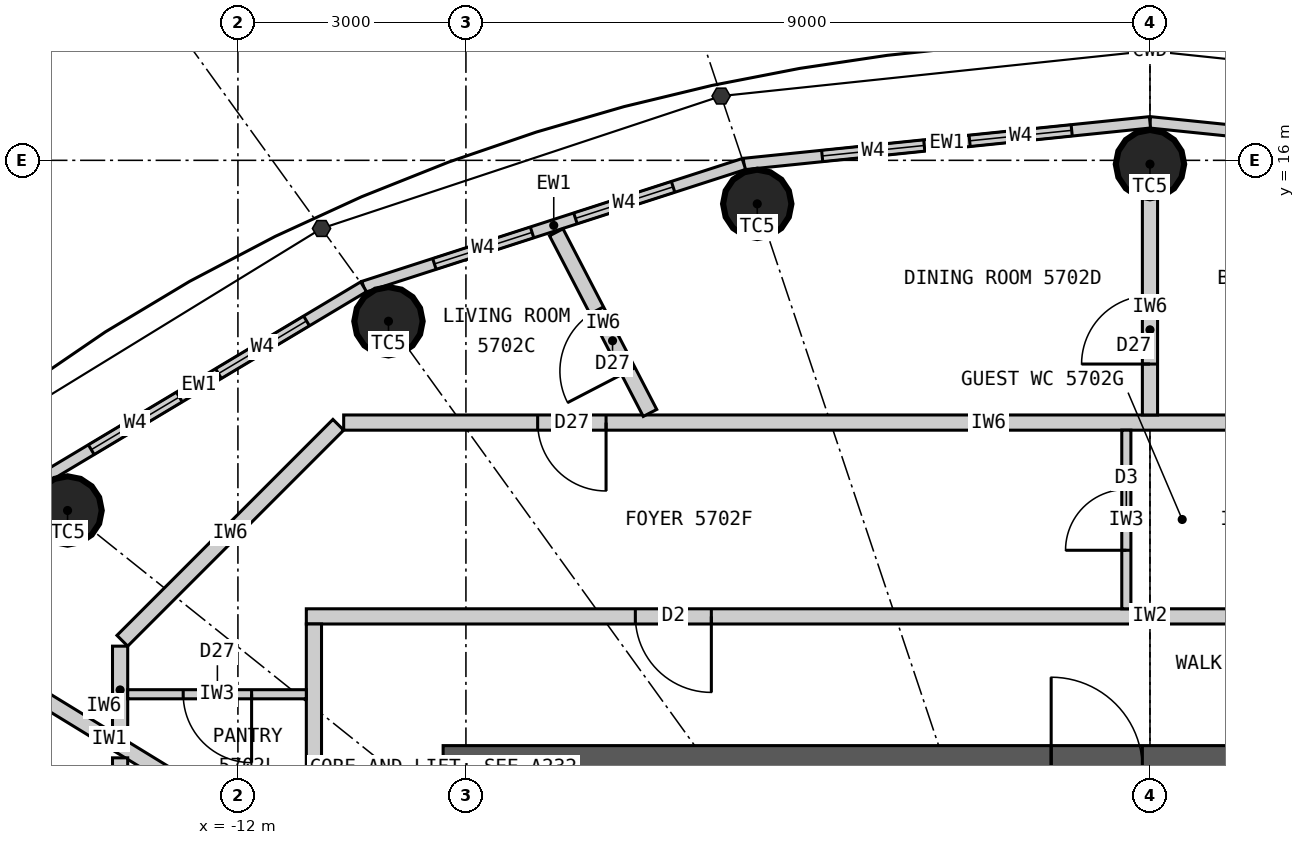
"""IFC4 building model, lengths in metres.
Left out: names, types, materials, properties, quantities, classifications, styles, units other than length and angle.
Written with IfcOpenShell. Run it as: python <this file> out.ifc"""

import sys

from ifc_helpers import new_model, si_unit, direction, frame, frame_2d, origin, origin_2d, place, context, subcontext, project, spatial, rectangle, circle, extrude, element, fill, save


model = new_model("IFC4")
c1 = context("Model", 3, precision=1e-05, world=origin(), true_north=direction((0.0, 1.0)))
c2 = subcontext(c1, "Body", "Model", "MODEL_VIEW")
j1 = project(units=[si_unit("LENGTHUNIT", "METRE"), si_unit("PLANEANGLEUNIT", "RADIAN")], contexts=[c1])
p1 = place(None, origin())
s1 = spatial("IfcSite", under=j1, at=p1, CompositionType="ELEMENT")
p2 = place(p1, origin())
s2 = spatial("IfcBuilding", under=s1, at=p2, CompositionType="ELEMENT")
p3 = place(p2, frame((0.0, 0.0, 212.7)))
s3 = spatial("IfcBuildingStorey", under=s2, at=p3, CompositionType="ELEMENT", Elevation=212.7)
for number, where, z_axis, x_axis in (
    (1, (0.0, 15.95, 0.0), (0.0, 0.0, 1.0), (1.0, 0.0, 0.0)),
    (2, (-5.167, 15.427, 0.0), (0.0, 0.0, 1.0), (1.0, 0.0, 0.0)),
    (3, (-10.019, 13.883, 0.0), (0.0, 0.0, 1.0), (1.0, 0.0, 0.0)),
    (4, (-14.241, 11.393, 0.0), (0.0, 0.0, 1.0), (1.0, 0.0, 0.0)),
):
    element("IfcColumn", number, at=place(p3, frame(where, z_axis=z_axis, x_axis=x_axis)), inside=s3, PredefinedType="COLUMN", context=c2, shape_type="SweptSolid", body=[
        extrude(circle(Radius=0.45, at=origin_2d()), origin(), (0.0, 0.0, 1.0), 3.3),
    ])
p4 = place(p3, frame((-9.3, 8.0, 0.0), z_axis=(0.0, 0.0, 1.0), x_axis=(1.0, 0.0, 0.0)))
e5 = element("IfcWall", 5, at=p4, inside=s3, PredefinedType="SHEAR", context=c2, shape_type="SweptSolid", body=[
    extrude(rectangle(XDim=18.6, YDim=0.6, at=frame_2d((9.3, 0.0))), origin(), (0.0, 0.0, 1.0), 3.3),
])
p5 = place(p4, frame((8.0, 0.0, 0.0)))
e6 = element("IfcOpeningElement", 6, at=p5, cuts=e5, PredefinedType="OPENING", context=c2, shape_type="SweptSolid", body=[
    extrude(rectangle(XDim=1.2, YDim=2.2, at=frame_2d((0.6, 1.1))), frame((0.0, 0.31, 0.0), z_axis=(0.0, -1.0, 0.0), x_axis=(1.0, 0.0, 0.0)), (0.0, 0.0, 1.0), 0.62),
])
p6 = place(p4, frame((15.6, 0.0, 0.0)))
e7 = element("IfcOpeningElement", 7, at=p6, cuts=e5, PredefinedType="OPENING", context=c2, shape_type="SweptSolid", body=[
    extrude(rectangle(XDim=0.9, YDim=2.2, at=frame_2d((0.45, 1.1))), frame((0.0, 0.31, 0.0), z_axis=(0.0, -1.0, 0.0), x_axis=(1.0, 0.0, 0.0)), (0.0, 0.0, 1.0), 0.62),
])
p7 = place(p3, frame((5.343, 15.952, 0.0), z_axis=(0.0, 0.0, 1.0), x_axis=(-0.994774574972, 0.102095763818, 0.0)))
e8 = element("IfcWall", 8, at=p7, inside=s3, PredefinedType="ELEMENTEDWALL", context=c2, shape_type="SweptSolid", body=[
    extrude(rectangle(XDim=5.371, YDim=0.15, at=frame_2d((2.686, 0.0))), origin(), (0.0, 0.0, 1.0), 3.12),
])
p8 = place(p7, frame((1.035, 0.0, 0.9)))
e9 = element("IfcOpeningElement", 9, at=p8, cuts=e8, PredefinedType="OPENING", context=c2, shape_type="SweptSolid", body=[
    extrude(rectangle(XDim=1.35, YDim=1.9, at=frame_2d((0.675, 0.95))), frame((0.0, 0.085, 0.0), z_axis=(0.0, -1.0, 0.0), x_axis=(1.0, 0.0, 0.0)), (0.0, 0.0, 1.0), 0.17),
])
p9 = place(p7, frame((2.985, 0.0, 0.9)))
e10 = element("IfcOpeningElement", 10, at=p9, cuts=e8, PredefinedType="OPENING", context=c2, shape_type="SweptSolid", body=[
    extrude(rectangle(XDim=1.35, YDim=1.9, at=frame_2d((0.675, 0.95))), frame((0.0, 0.085, 0.0), z_axis=(0.0, -1.0, 0.0), x_axis=(1.0, 0.0, 0.0)), (0.0, 0.0, 1.0), 0.17),
])
p10 = place(p3, frame((0.0, 16.5, 0.0), z_axis=(0.0, 0.0, 1.0), x_axis=(-0.994774574972, -0.102095763818, 0.0)))
e11 = element("IfcWall", 11, at=p10, inside=s3, PredefinedType="ELEMENTEDWALL", context=c2, shape_type="SweptSolid", body=[
    extrude(rectangle(XDim=5.371, YDim=0.15, at=frame_2d((2.686, 0.0))), origin(), (0.0, 0.0, 1.0), 3.12),
])
p11 = place(p10, frame((1.035, 0.0, 0.9)))
e12 = element("IfcOpeningElement", 12, at=p11, cuts=e11, PredefinedType="OPENING", context=c2, shape_type="SweptSolid", body=[
    extrude(rectangle(XDim=1.35, YDim=1.9, at=frame_2d((0.675, 0.95))), frame((0.0, 0.085, 0.0), z_axis=(0.0, -1.0, 0.0), x_axis=(1.0, 0.0, 0.0)), (0.0, 0.0, 1.0), 0.17),
])
p12 = place(p10, frame((2.985, 0.0, 0.9)))
e13 = element("IfcOpeningElement", 13, at=p12, cuts=e11, PredefinedType="OPENING", context=c2, shape_type="SweptSolid", body=[
    extrude(rectangle(XDim=1.35, YDim=1.9, at=frame_2d((0.675, 0.95))), frame((0.0, 0.085, 0.0), z_axis=(0.0, -1.0, 0.0), x_axis=(1.0, 0.0, 0.0)), (0.0, 0.0, 1.0), 0.17),
])
p13 = place(p3, frame((-5.343, 15.952, 0.0), z_axis=(0.0, 0.0, 1.0), x_axis=(-0.951644702515, -0.307200846638, 0.0)))
e14 = element("IfcWall", 14, at=p13, inside=s3, PredefinedType="ELEMENTEDWALL", context=c2, shape_type="SweptSolid", body=[
    extrude(rectangle(XDim=5.258, YDim=0.15, at=frame_2d((2.629, 0.0))), origin(), (0.0, 0.0, 1.0), 3.12),
])
p14 = place(p13, frame((0.979, 0.0, 0.9)))
e15 = element("IfcOpeningElement", 15, at=p14, cuts=e14, PredefinedType="OPENING", context=c2, shape_type="SweptSolid", body=[
    extrude(rectangle(XDim=1.35, YDim=1.9, at=frame_2d((0.675, 0.95))), frame((0.0, 0.085, 0.0), z_axis=(0.0, -1.0, 0.0), x_axis=(1.0, 0.0, 0.0)), (0.0, 0.0, 1.0), 0.17),
])
p15 = place(p13, frame((2.929, 0.0, 0.9)))
e16 = element("IfcOpeningElement", 16, at=p15, cuts=e14, PredefinedType="OPENING", context=c2, shape_type="SweptSolid", body=[
    extrude(rectangle(XDim=1.35, YDim=1.9, at=frame_2d((0.675, 0.95))), frame((0.0, 0.085, 0.0), z_axis=(0.0, -1.0, 0.0), x_axis=(1.0, 0.0, 0.0)), (0.0, 0.0, 1.0), 0.17),
])
p16 = place(p3, frame((-10.346, 14.336, 0.0), z_axis=(0.0, 0.0, 1.0), x_axis=(-0.85822150553, -0.513279502265, 0.0)))
e17 = element("IfcWall", 17, at=p16, inside=s3, PredefinedType="ELEMENTEDWALL", context=c2, shape_type="SweptSolid", body=[
    extrude(rectangle(XDim=5.05, YDim=0.15, at=frame_2d((2.525, 0.0))), origin(), (0.0, 0.0, 1.0), 3.12),
])
p17 = place(p16, frame((0.875, 0.0, 0.9)))
e18 = element("IfcOpeningElement", 18, at=p17, cuts=e17, PredefinedType="OPENING", context=c2, shape_type="SweptSolid", body=[
    extrude(rectangle(XDim=1.35, YDim=1.9, at=frame_2d((0.675, 0.95))), frame((0.0, 0.085, 0.0), z_axis=(0.0, -1.0, 0.0), x_axis=(1.0, 0.0, 0.0)), (0.0, 0.0, 1.0), 0.17),
])
p18 = place(p16, frame((2.825, 0.0, 0.9)))
e19 = element("IfcOpeningElement", 19, at=p18, cuts=e17, PredefinedType="OPENING", context=c2, shape_type="SweptSolid", body=[
    extrude(rectangle(XDim=1.35, YDim=1.9, at=frame_2d((0.675, 0.95))), frame((0.0, 0.085, 0.0), z_axis=(0.0, -1.0, 0.0), x_axis=(1.0, 0.0, 0.0)), (0.0, 0.0, 1.0), 0.17),
])
p19 = place(p3, frame((-11.1, 10.0, 0.0), z_axis=(0.0, 0.0, 1.0), x_axis=(1.0, 0.0, 0.0)))
e20 = element("IfcWall", 20, at=p19, inside=s3, PredefinedType="PARTITIONING", context=c2, shape_type="SweptSolid", body=[
    extrude(rectangle(XDim=22.2, YDim=0.2, at=frame_2d((11.1, 0.0))), origin(), (0.0, 0.0, 1.0), 3.12),
])
p20 = place(p19, frame((20.9, 0.0, 0.0)))
e21 = element("IfcOpeningElement", 21, at=p20, cuts=e20, PredefinedType="OPENING", context=c2, shape_type="SweptSolid", body=[
    extrude(rectangle(XDim=1.0, YDim=2.2, at=frame_2d((0.5, 1.1))), frame((0.0, 0.11, 0.0), z_axis=(0.0, -1.0, 0.0), x_axis=(1.0, 0.0, 0.0)), (0.0, 0.0, 1.0), 0.22),
])
p21 = place(p19, frame((4.329, 0.0, 0.0)))
e22 = element("IfcOpeningElement", 22, at=p21, cuts=e20, PredefinedType="OPENING", context=c2, shape_type="SweptSolid", body=[
    extrude(rectangle(XDim=1.0, YDim=2.2, at=frame_2d((0.5, 1.1))), frame((0.0, 0.11, 0.0), z_axis=(0.0, -1.0, 0.0), x_axis=(1.0, 0.0, 0.0)), (0.0, 0.0, 1.0), 0.22),
])
p22 = place(p3, frame((-11.0, 9.9, 0.0), z_axis=(0.0, 0.0, 1.0), x_axis=(0.0, -1.0, 0.0)))
e23 = element("IfcWall", 23, at=p22, inside=s3, PredefinedType="PARTITIONING", context=c2, shape_type="SweptSolid", body=[
    extrude(rectangle(XDim=19.8, YDim=0.2, at=frame_2d((9.9, 0.0))), origin(), (0.0, 0.0, 1.0), 3.12),
])
p23 = place(p22, frame((5.075, 0.0, 0.0)))
e24 = element("IfcOpeningElement", 24, at=p23, cuts=e23, PredefinedType="OPENING", context=c2, shape_type="SweptSolid", body=[
    extrude(rectangle(XDim=1.0, YDim=2.2, at=frame_2d((0.5, 1.1))), frame((0.0, 0.11, 0.0), z_axis=(0.0, -1.0, 0.0), x_axis=(1.0, 0.0, 0.0)), (0.0, 0.0, 1.0), 0.22),
])
p24 = place(p22, frame((18.645, 0.0, 0.0)))
e25 = element("IfcOpeningElement", 25, at=p24, cuts=e23, PredefinedType="OPENING", context=c2, shape_type="SweptSolid", body=[
    extrude(rectangle(XDim=1.0, YDim=2.2, at=frame_2d((0.5, 1.1))), frame((0.0, 0.11, 0.0), z_axis=(0.0, -1.0, 0.0), x_axis=(1.0, 0.0, 0.0)), (0.0, 0.0, 1.0), 0.22),
])
p25 = place(p3, frame((-11.1, 6.797, 0.0), z_axis=(0.0, 0.0, 1.0), x_axis=(-0.852799818179, 0.522237943963, 0.0)))
e26 = element("IfcWall", 26, at=p25, inside=s3, PredefinedType="PARTITIONING", context=c2, shape_type="SweptSolid", body=[
    extrude(rectangle(XDim=6.077, YDim=0.2, at=frame_2d((3.039, 0.0))), origin(), (0.0, 0.0, 1.0), 3.12),
])
p26 = place(p3, frame((6.364, 12.55, 0.0), z_axis=(0.0, 0.0, 1.0), x_axis=(-1.0, 0.0, 0.0)))
e27 = element("IfcWall", 27, at=p26, inside=s3, PredefinedType="PARTITIONING", context=c2, shape_type="SweptSolid", body=[
    extrude(rectangle(XDim=16.972, YDim=0.2, at=frame_2d((8.486, 0.0))), origin(), (0.0, 0.0, 1.0), 3.12),
])
p27 = place(p26, frame((2.525, 0.0, 0.0)))
e28 = element("IfcOpeningElement", 28, at=p27, cuts=e27, PredefinedType="OPENING", context=c2, shape_type="SweptSolid", body=[
    extrude(rectangle(XDim=0.8, YDim=2.1, at=frame_2d((0.4, 1.05))), frame((0.0, 0.11, 0.0), z_axis=(0.0, -1.0, 0.0), x_axis=(1.0, 0.0, 0.0)), (0.0, 0.0, 1.0), 0.22),
])
p28 = place(p26, frame((4.145, 0.0, 0.0)))
e29 = element("IfcOpeningElement", 29, at=p28, cuts=e27, PredefinedType="OPENING", context=c2, shape_type="SweptSolid", body=[
    extrude(rectangle(XDim=0.9, YDim=2.1, at=frame_2d((0.45, 1.05))), frame((0.0, 0.11, 0.0), z_axis=(0.0, -1.0, 0.0), x_axis=(1.0, 0.0, 0.0)), (0.0, 0.0, 1.0), 0.22),
])
p29 = place(p26, frame((13.52, 0.0, 0.0)))
e30 = element("IfcOpeningElement", 30, at=p29, cuts=e27, PredefinedType="OPENING", context=c2, shape_type="SweptSolid", body=[
    extrude(rectangle(XDim=0.9, YDim=2.1, at=frame_2d((0.45, 1.05))), frame((0.0, 0.11, 0.0), z_axis=(0.0, -1.0, 0.0), x_axis=(1.0, 0.0, 0.0)), (0.0, 0.0, 1.0), 0.22),
])
p30 = place(p3, frame((-10.679, 12.521, 0.0), z_axis=(0.0, 0.0, 1.0), x_axis=(-0.707106781187, -0.707106781187, 0.0)))
e31 = element("IfcWall", 31, at=p30, inside=s3, PredefinedType="PARTITIONING", context=c2, shape_type="SweptSolid", body=[
    extrude(rectangle(XDim=4.019, YDim=0.2, at=frame_2d((2.009, 0.0))), origin(), (0.0, 0.0, 1.0), 3.12),
])
p31 = place(p3, frame((-13.55, 9.609, 0.0), z_axis=(0.0, 0.0, 1.0), x_axis=(0.0, -1.0, 0.0)))
e32 = element("IfcWall", 32, at=p31, inside=s3, PredefinedType="PARTITIONING", context=c2, shape_type="SweptSolid", body=[
    extrude(rectangle(XDim=1.153, YDim=0.2, at=frame_2d((0.576, 0.0))), origin(), (0.0, 0.0, 1.0), 3.12),
])
p32 = place(p3, frame((0.0, 12.65, 0.0), z_axis=(0.0, 0.0, 1.0), x_axis=(0.0, 1.0, 0.0)))
e33 = element("IfcWall", 33, at=p32, inside=s3, PredefinedType="PARTITIONING", context=c2, shape_type="SweptSolid", body=[
    extrude(rectangle(XDim=2.85, YDim=0.2, at=frame_2d((1.425, 0.0))), origin(), (0.0, 0.0, 1.0), 2.42),
])
p33 = place(p32, frame((0.67, 0.0, 0.0)))
e34 = element("IfcOpeningElement", 34, at=p33, cuts=e33, PredefinedType="OPENING", context=c2, shape_type="SweptSolid", body=[
    extrude(rectangle(XDim=0.9, YDim=2.1, at=frame_2d((0.45, 1.05))), frame((0.0, 0.11, 0.0), z_axis=(0.0, -1.0, 0.0), x_axis=(1.0, 0.0, 0.0)), (0.0, 0.0, 1.0), 0.22),
])
p34 = place(p3, frame((-6.578, 12.677, 0.0), z_axis=(0.0, 0.0, 1.0), x_axis=(-0.460620531465, 0.887597164255, 0.0)))
e35 = element("IfcWall", 35, at=p34, inside=s3, PredefinedType="PARTITIONING", context=c2, shape_type="SweptSolid", body=[
    extrude(rectangle(XDim=2.678, YDim=0.2, at=frame_2d((1.339, 0.0))), origin(), (0.0, 0.0, 1.0), 3.12),
])
p35 = place(p34, frame((0.62, 0.0, 0.0)))
e36 = element("IfcOpeningElement", 36, at=p35, cuts=e35, PredefinedType="OPENING", context=c2, shape_type="SweptSolid", body=[
    extrude(rectangle(XDim=0.9, YDim=2.1, at=frame_2d((0.45, 1.05))), frame((0.0, 0.11, 0.0), z_axis=(0.0, -1.0, 0.0), x_axis=(1.0, 0.0, 0.0)), (0.0, 0.0, 1.0), 0.22),
])
p36 = place(p3, frame((-0.311, 10.1, 0.0), z_axis=(0.0, 0.0, 1.0), x_axis=(0.0, 1.0, 0.0)))
e37 = element("IfcWall", 37, at=p36, inside=s3, PredefinedType="PARTITIONING", context=c2, shape_type="SweptSolid", body=[
    extrude(rectangle(XDim=2.35, YDim=0.12, at=frame_2d((1.175, 0.0))), origin(), (0.0, 0.0, 1.0), 3.12),
])
p37 = place(p36, frame((0.77, 0.0, 0.0)))
e38 = element("IfcOpeningElement", 38, at=p37, cuts=e37, PredefinedType="OPENING", context=c2, shape_type="SweptSolid", body=[
    extrude(rectangle(XDim=0.8, YDim=2.1, at=frame_2d((0.4, 1.05))), frame((0.0, 0.07, 0.0), z_axis=(0.0, -1.0, 0.0), x_axis=(1.0, 0.0, 0.0)), (0.0, 0.0, 1.0), 0.14),
])
p38 = place(p3, frame((-11.1, 8.976, 0.0), z_axis=(0.0, 0.0, 1.0), x_axis=(-1.0, 0.0, 0.0)))
e39 = element("IfcWall", 39, at=p38, inside=s3, PredefinedType="PARTITIONING", context=c2, shape_type="SweptSolid", body=[
    extrude(rectangle(XDim=2.35, YDim=0.12, at=frame_2d((1.175, 0.0))), origin(), (0.0, 0.0, 1.0), 3.12),
])
p39 = place(p38, frame((0.72, 0.0, 0.0)))
e40 = element("IfcOpeningElement", 40, at=p39, cuts=e39, PredefinedType="OPENING", context=c2, shape_type="SweptSolid", body=[
    extrude(rectangle(XDim=0.9, YDim=2.1, at=frame_2d((0.45, 1.05))), frame((0.0, 0.07, 0.0), z_axis=(0.0, -1.0, 0.0), x_axis=(1.0, 0.0, 0.0)), (0.0, 0.0, 1.0), 0.14),
])
p40 = place(p3, frame((-13.55, 8.139, 0.0), z_axis=(0.0, 0.0, 1.0), x_axis=(0.0, -1.0, 0.0)))
e41 = element("IfcWall", 41, at=p40, inside=s3, PredefinedType="PARTITIONING", context=c2, shape_type="SweptSolid", body=[
    extrude(rectangle(XDim=12.496, YDim=0.2, at=frame_2d((6.248, 0.0))), origin(), (0.0, 0.0, 1.0), 3.12),
])
p41 = place(p40, frame((7.031, 0.0, 0.0)))
e42 = element("IfcOpeningElement", 42, at=p41, cuts=e41, PredefinedType="OPENING", context=c2, shape_type="SweptSolid", body=[
    extrude(rectangle(XDim=0.9, YDim=2.1, at=frame_2d((0.45, 1.05))), frame((0.0, 0.11, 0.0), z_axis=(0.0, -1.0, 0.0), x_axis=(1.0, 0.0, 0.0)), (0.0, 0.0, 1.0), 0.22),
])
p42 = place(p40, frame((9.373, 0.0, 0.0)))
e43 = element("IfcOpeningElement", 43, at=p42, cuts=e41, PredefinedType="OPENING", context=c2, shape_type="SweptSolid", body=[
    extrude(rectangle(XDim=0.8, YDim=2.1, at=frame_2d((0.4, 1.05))), frame((0.0, 0.11, 0.0), z_axis=(0.0, -1.0, 0.0), x_axis=(1.0, 0.0, 0.0)), (0.0, 0.0, 1.0), 0.22),
])
p43 = place(p40, frame((3.789, 0.0, 0.0)))
e44 = element("IfcOpeningElement", 44, at=p43, cuts=e41, PredefinedType="OPENING", context=c2, shape_type="SweptSolid", body=[
    extrude(rectangle(XDim=0.9, YDim=2.1, at=frame_2d((0.45, 1.05))), frame((0.0, 0.11, 0.0), z_axis=(0.0, -1.0, 0.0), x_axis=(1.0, 0.0, 0.0)), (0.0, 0.0, 1.0), 0.22),
])
p44 = place(p11, origin())
e45 = element("IfcWindow", 45, at=p44, inside=s3, PartitioningType="SINGLE_PANEL", PredefinedType="WINDOW", context=c2, shape_type="SweptSolid", body=[
    extrude(rectangle(XDim=1.35, YDim=1.9, at=frame_2d((0.675, 0.95))), frame((0.0, 0.03, 0.0), z_axis=(0.0, -1.0, 0.0), x_axis=(1.0, 0.0, 0.0)), (0.0, 0.0, 1.0), 0.06),
])
fill(e12, e45)
p45 = place(p12, origin())
e46 = element("IfcWindow", 46, at=p45, inside=s3, PartitioningType="SINGLE_PANEL", PredefinedType="WINDOW", context=c2, shape_type="SweptSolid", body=[
    extrude(rectangle(XDim=1.35, YDim=1.9, at=frame_2d((0.675, 0.95))), frame((0.0, 0.03, 0.0), z_axis=(0.0, -1.0, 0.0), x_axis=(1.0, 0.0, 0.0)), (0.0, 0.0, 1.0), 0.06),
])
fill(e13, e46)
p46 = place(p14, origin())
e47 = element("IfcWindow", 47, at=p46, inside=s3, PartitioningType="SINGLE_PANEL", PredefinedType="WINDOW", context=c2, shape_type="SweptSolid", body=[
    extrude(rectangle(XDim=1.35, YDim=1.9, at=frame_2d((0.675, 0.95))), frame((0.0, 0.03, 0.0), z_axis=(0.0, -1.0, 0.0), x_axis=(1.0, 0.0, 0.0)), (0.0, 0.0, 1.0), 0.06),
])
fill(e15, e47)
p47 = place(p15, origin())
e48 = element("IfcWindow", 48, at=p47, inside=s3, PartitioningType="SINGLE_PANEL", PredefinedType="WINDOW", context=c2, shape_type="SweptSolid", body=[
    extrude(rectangle(XDim=1.35, YDim=1.9, at=frame_2d((0.675, 0.95))), frame((0.0, 0.03, 0.0), z_axis=(0.0, -1.0, 0.0), x_axis=(1.0, 0.0, 0.0)), (0.0, 0.0, 1.0), 0.06),
])
fill(e16, e48)
p48 = place(p17, origin())
e49 = element("IfcWindow", 49, at=p48, inside=s3, PartitioningType="SINGLE_PANEL", PredefinedType="WINDOW", context=c2, shape_type="SweptSolid", body=[
    extrude(rectangle(XDim=1.35, YDim=1.9, at=frame_2d((0.675, 0.95))), frame((0.0, 0.03, 0.0), z_axis=(0.0, -1.0, 0.0), x_axis=(1.0, 0.0, 0.0)), (0.0, 0.0, 1.0), 0.06),
])
fill(e18, e49)
p49 = place(p18, origin())
e50 = element("IfcWindow", 50, at=p49, inside=s3, PartitioningType="SINGLE_PANEL", PredefinedType="WINDOW", context=c2, shape_type="SweptSolid", body=[
    extrude(rectangle(XDim=1.35, YDim=1.9, at=frame_2d((0.675, 0.95))), frame((0.0, 0.03, 0.0), z_axis=(0.0, -1.0, 0.0), x_axis=(1.0, 0.0, 0.0)), (0.0, 0.0, 1.0), 0.06),
])
fill(e19, e50)
p50 = place(p21, origin())
e51 = element("IfcDoor", 51, at=p50, inside=s3, OperationType="SINGLE_SWING_RIGHT", PredefinedType="DOOR", context=c2, shape_type="SweptSolid", body=[
    extrude(rectangle(XDim=1.0, YDim=2.2, at=frame_2d((0.5, 1.1))), frame((0.0, 0.025, 0.0), z_axis=(0.0, -1.0, 0.0), x_axis=(1.0, 0.0, 0.0)), (0.0, 0.0, 1.0), 0.05),
])
fill(e22, e51)
p51 = place(p37, origin())
e52 = element("IfcDoor", 52, at=p51, inside=s3, OperationType="SINGLE_SWING_LEFT", PredefinedType="DOOR", context=c2, shape_type="SweptSolid", body=[
    extrude(rectangle(XDim=0.8, YDim=2.1, at=frame_2d((0.4, 1.05))), frame((0.0, 0.025, 0.0), z_axis=(0.0, -1.0, 0.0), x_axis=(1.0, 0.0, 0.0)), (0.0, 0.0, 1.0), 0.05),
])
fill(e38, e52)
p52 = place(p39, origin())
e53 = element("IfcDoor", 53, at=p52, inside=s3, OperationType="SINGLE_SWING_LEFT", PredefinedType="DOOR", context=c2, shape_type="SweptSolid", body=[
    extrude(rectangle(XDim=0.9, YDim=2.1, at=frame_2d((0.45, 1.05))), frame((0.0, 0.025, 0.0), z_axis=(0.0, -1.0, 0.0), x_axis=(1.0, 0.0, 0.0)), (0.0, 0.0, 1.0), 0.05),
])
fill(e40, e53)
p53 = place(p29, origin())
e54 = element("IfcDoor", 54, at=p53, inside=s3, OperationType="SINGLE_SWING_LEFT", PredefinedType="DOOR", context=c2, shape_type="SweptSolid", body=[
    extrude(rectangle(XDim=0.9, YDim=2.1, at=frame_2d((0.45, 1.05))), frame((0.0, 0.025, 0.0), z_axis=(0.0, -1.0, 0.0), x_axis=(1.0, 0.0, 0.0)), (0.0, 0.0, 1.0), 0.05),
])
fill(e30, e54)
p54 = place(p33, origin())
e55 = element("IfcDoor", 55, at=p54, inside=s3, OperationType="SINGLE_SWING_LEFT", PredefinedType="DOOR", context=c2, shape_type="SweptSolid", body=[
    extrude(rectangle(XDim=0.9, YDim=2.1, at=frame_2d((0.45, 1.05))), frame((0.0, 0.025, 0.0), z_axis=(0.0, -1.0, 0.0), x_axis=(1.0, 0.0, 0.0)), (0.0, 0.0, 1.0), 0.05),
])
fill(e34, e55)
p55 = place(p35, origin())
e56 = element("IfcDoor", 56, at=p55, inside=s3, OperationType="SINGLE_SWING_LEFT", PredefinedType="DOOR", context=c2, shape_type="SweptSolid", body=[
    extrude(rectangle(XDim=0.9, YDim=2.1, at=frame_2d((0.45, 1.05))), frame((0.0, 0.025, 0.0), z_axis=(0.0, -1.0, 0.0), x_axis=(1.0, 0.0, 0.0)), (0.0, 0.0, 1.0), 0.05),
])
fill(e36, e56)
save(model, sys.argv[1])
